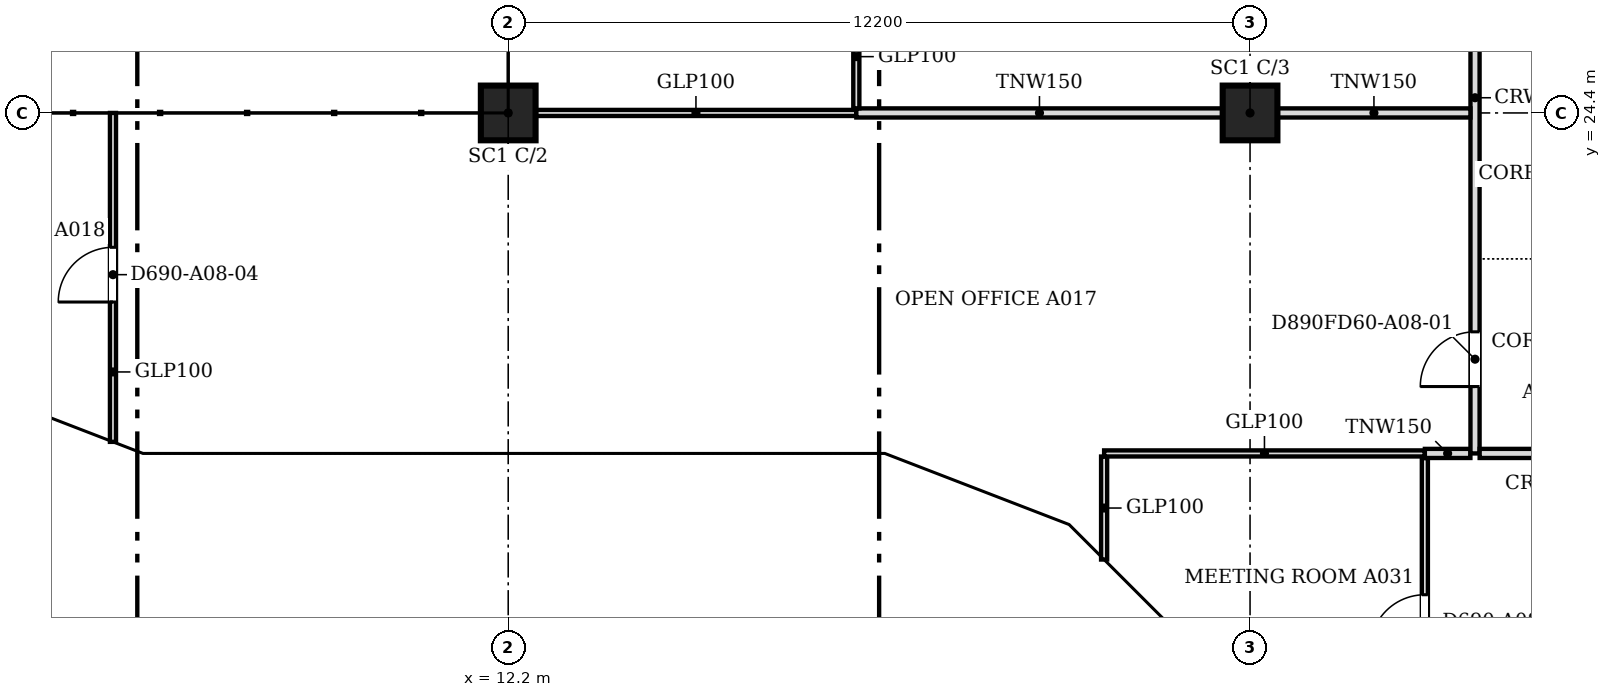
"""IFC4 building model, lengths in metres.
Left out: names, types, materials, properties, quantities, classifications, styles, units other than length and angle.
Written with IfcOpenShell. Run it as: python <this file> out.ifc"""

import sys

from ifc_helpers import new_model, si_unit, direction, frame, frame_2d, origin, origin_2d, place, context, subcontext, project, spatial, polyline, rectangle, outline, extrude, faceted_brep, source, transform, mapped, element, fill, save


model = new_model("IFC4")
c1 = context("Model", 3, precision=1e-05, world=origin(), true_north=direction((0.0, 1.0)))
c2 = subcontext(c1, "Body", "Model", "MODEL_VIEW")
j1 = project(units=[si_unit("LENGTHUNIT", "METRE"), si_unit("PLANEANGLEUNIT", "RADIAN")], contexts=[c1])
p1 = place(None, origin())
s1 = spatial("IfcSite", under=j1, at=p1, CompositionType="ELEMENT")
p2 = place(p1, origin())
s2 = spatial("IfcBuilding", under=s1, at=p2, CompositionType="ELEMENT")
p3 = place(p2, frame((0.0, 0.0, 91.4)))
s3 = spatial("IfcBuildingStorey", under=s2, at=p3, CompositionType="ELEMENT", Elevation=91.4)
for number, where, z_axis, x_axis in (
    (1, (12.2, 24.4, 0.0), (0.0, 0.0, 1.0), (1.0, 0.0, 0.0)),
    (2, (24.4, 24.4, 0.0), (0.0, 0.0, 1.0), (1.0, 0.0, 0.0)),
):
    element("IfcColumn", number, at=place(p3, frame(where, z_axis=z_axis, x_axis=x_axis)), inside=s3, PredefinedType="COLUMN", context=c2, shape_type="SweptSolid", body=[
        extrude(rectangle(XDim=0.9, YDim=0.9, at=origin_2d()), origin(), (0.0, 0.0, 1.0), 3.6),
    ])
m1 = source(origin(), c2, "Body", "Brep", [
    faceted_brep([(2.95, -0.25, 0.0), (2.997, -0.25, 0.059), (2.997, -0.25, 7.541), (2.95, -0.25, 7.6), (0.0, -0.25, 3.8), (0.053, 0.25, 3.868), (2.904, 0.25, 7.54), (2.904, 0.25, 0.06), (0.053, 0.25, 3.732), (2.95, 0.0, 0.0), (2.95, 0.0, 7.6), (0.0, 0.0, 3.8)], [[[0, 1, 2, 3, 4]], [[5, 6, 7, 8]], [[1, 0, 9]], [[10, 3, 2]], [[6, 5, 11, 4, 3, 10]], [[8, 7, 9, 0, 4, 11]], [[8, 11, 5]], [[1, 9, 7, 6, 10, 2]]]),
])
p4 = place(p3, frame((3.394, 19.612, -3.8), z_axis=(0.0, 0.0, 1.0), x_axis=(0.932990326376, -0.359901446078, 0.0)))
e3 = element("IfcWall", 3, at=p4, inside=s3, PredefinedType="SOLIDWALL", context=c2, shape_type="MappedRepresentation", body=[
    mapped(m1, transform((0.0, 0.0, 0.0), scale=1.0)),
])
m2 = source(origin(), c2, "Body", "SweptSolid", [
    extrude(outline(polyline([(2.75, 6.935), (0.316, 3.8), (2.75, 0.665), (2.75, 6.935)])), frame((0.0, 0.26, 0.0), z_axis=(0.0, -1.0, 0.0), x_axis=(1.0, 0.0, 0.0)), (0.0, 0.0, 1.0), 0.52),
])
p5 = place(p4, origin())
e4 = element("IfcOpeningElement", 4, at=p5, cuts=e3, PredefinedType="OPENING", context=c2, shape_type="MappedRepresentation", body=[
    mapped(m2, transform((0.0, 0.0, 0.0), scale=1.0)),
])
m3 = source(origin(), c2, "Body", "Brep", [
    faceted_brep([(0.047, -0.25, 0.0), (3.05, -0.25, 3.8), (0.047, -0.25, 7.6), (0.0, -0.25, 7.54), (0.0, -0.25, 0.06), (0.093, 0.25, 7.541), (3.05, 0.25, 3.8), (0.093, 0.25, 0.059), (0.047, 0.0, 0.0), (0.047, 0.0, 7.6)], [[[0, 1, 2, 3, 4]], [[5, 6, 7]], [[7, 6, 1, 0, 8]], [[6, 5, 9, 2, 1]], [[3, 2, 9]], [[8, 0, 4]], [[7, 8, 4, 3, 9, 5]]]),
])
p6 = place(p3, frame((6.1, 18.55, -3.8), z_axis=(0.0, 0.0, 1.0), x_axis=(1.0, 0.0, 0.0)))
e5 = element("IfcWall", 5, at=p6, inside=s3, PredefinedType="SOLIDWALL", context=c2, shape_type="MappedRepresentation", body=[
    mapped(m3, transform((0.0, 0.0, 0.0), scale=1.0)),
])
m4 = source(origin(), c2, "Body", "SweptSolid", [
    extrude(outline(polyline([(0.247, 0.656), (2.731, 3.8), (0.247, 6.944), (0.247, 0.656)])), frame((0.0, 0.26, 0.0), z_axis=(0.0, -1.0, 0.0), x_axis=(1.0, 0.0, 0.0)), (0.0, 0.0, 1.0), 0.52),
])
p7 = place(p6, origin())
e6 = element("IfcOpeningElement", 6, at=p7, cuts=e5, PredefinedType="OPENING", context=c2, shape_type="MappedRepresentation", body=[
    mapped(m4, transform((0.0, 0.0, 0.0), scale=1.0)),
])
m5 = source(origin(), c2, "Body", "SweptSolid", [
    extrude(outline(polyline([(3.05, 0.0), (6.1, 3.8), (3.05, 7.6), (0.0, 3.8), (3.05, 0.0)])), frame((0.0, 0.25, 0.0), z_axis=(0.0, -1.0, 0.0), x_axis=(1.0, 0.0, 0.0)), (0.0, 0.0, 1.0), 0.5),
])
p8 = place(p3, frame((9.15, 18.55, -3.8), z_axis=(0.0, 0.0, 1.0), x_axis=(1.0, 0.0, 0.0)))
e7 = element("IfcWall", 7, at=p8, inside=s3, PredefinedType="SOLIDWALL", context=c2, shape_type="MappedRepresentation", body=[
    mapped(m5, transform((0.0, 0.0, 0.0), scale=1.0)),
])
m6 = source(origin(), c2, "Body", "SweptSolid", [
    extrude(outline(polyline([(3.05, 0.399), (5.78, 3.8), (3.05, 7.2), (0.321, 3.8), (3.05, 0.399)])), frame((0.0, 0.26, 0.0), z_axis=(0.0, -1.0, 0.0), x_axis=(1.0, 0.0, 0.0)), (0.0, 0.0, 1.0), 0.52),
])
p9 = place(p8, origin())
e8 = element("IfcOpeningElement", 8, at=p9, cuts=e7, PredefinedType="OPENING", context=c2, shape_type="MappedRepresentation", body=[
    mapped(m6, transform((0.0, 0.0, 0.0), scale=1.0)),
])
m7 = source(origin(), c2, "Body", "Brep", [
    faceted_brep([(3.05, -0.25, 7.543), (0.0, -0.25, 3.8), (3.05, -0.25, 0.057), (0.0, 0.25, 3.8), (3.096, 0.25, 7.6), (3.143, 0.25, 7.543), (3.143, 0.25, 0.056), (3.096, 0.25, 0.0), (3.096, -0.0, 0.0), (3.096, -0.0, 7.6)], [[[0, 1, 2]], [[3, 4, 5, 6, 7]], [[7, 6, 8]], [[5, 4, 9]], [[4, 3, 1, 0, 9]], [[3, 7, 8, 2, 1]], [[2, 8, 6, 5, 9, 0]]]),
])
p10 = place(p3, frame((15.25, 18.55, -3.8), z_axis=(0.0, 0.0, 1.0), x_axis=(1.0, 0.0, 0.0)))
e9 = element("IfcWall", 9, at=p10, inside=s3, PredefinedType="SOLIDWALL", context=c2, shape_type="MappedRepresentation", body=[
    mapped(m7, transform((0.0, 0.0, 0.0), scale=1.0)),
])
m8 = source(origin(), c2, "Body", "SweptSolid", [
    extrude(outline(polyline([(2.896, 6.959), (0.323, 3.8), (2.896, 0.641), (2.896, 6.959)])), frame((0.0, 0.26, 0.0), z_axis=(0.0, -1.0, 0.0), x_axis=(1.0, 0.0, 0.0)), (0.0, 0.0, 1.0), 0.52),
])
p11 = place(p10, origin())
e10 = element("IfcOpeningElement", 10, at=p11, cuts=e9, PredefinedType="OPENING", context=c2, shape_type="MappedRepresentation", body=[
    mapped(m8, transform((0.0, 0.0, 0.0), scale=1.0)),
])
m9 = source(origin(), c2, "Body", "Brep", [
    faceted_brep([(0.093, -0.25, 0.056), (3.143, -0.25, 3.736), (3.143, -0.25, 3.864), (0.093, -0.25, 7.544), (0.0, 0.25, 7.543), (0.047, 0.25, 7.6), (3.196, 0.25, 3.8), (0.047, 0.25, 0.0), (0.0, 0.25, 0.057), (3.196, -0.0, 3.8), (0.047, 0.0, 0.0), (0.047, 0.0, 7.6)], [[[0, 1, 2, 3]], [[4, 5, 6, 7, 8]], [[7, 6, 9, 1, 0, 10]], [[6, 5, 11, 3, 2, 9]], [[5, 4, 11]], [[8, 7, 10]], [[8, 10, 0, 3, 11, 4]], [[1, 9, 2]]]),
])
p12 = place(p3, frame((18.303, 18.567, -3.8), z_axis=(0.0, 0.0, 1.0), x_axis=(0.932978940178, -0.359930961693, 0.0)))
e11 = element("IfcWall", 11, at=p12, inside=s3, PredefinedType="SOLIDWALL", context=c2, shape_type="MappedRepresentation", body=[
    mapped(m9, transform((0.0, 0.0, 0.0), scale=1.0)),
])
m10 = source(origin(), c2, "Body", "SweptSolid", [
    extrude(outline(polyline([(0.247, 0.633), (2.871, 3.8), (0.247, 6.967), (0.247, 0.633)])), frame((0.0, 0.26, 0.0), z_axis=(0.0, -1.0, 0.0), x_axis=(1.0, 0.0, 0.0)), (0.0, 0.0, 1.0), 0.52),
])
p13 = place(p12, origin())
e12 = element("IfcOpeningElement", 12, at=p13, cuts=e11, PredefinedType="OPENING", context=c2, shape_type="MappedRepresentation", body=[
    mapped(m10, transform((0.0, 0.0, 0.0), scale=1.0)),
])
m11 = source(origin(), c2, "Body", "Brep", [
    faceted_brep([(3.103, -0.25, 7.536), (0.053, -0.25, 3.864), (0.053, -0.25, 3.736), (3.103, -0.25, 0.064), (0.0, 0.25, 3.8), (3.156, 0.25, 7.6), (3.209, 0.25, 7.536), (3.209, 0.25, 0.064), (3.156, 0.25, 0.0), (3.156, -0.0, 0.0), (3.156, -0.0, 7.6), (0.0, 0.0, 3.8)], [[[0, 1, 2, 3]], [[4, 5, 6, 7, 8]], [[8, 7, 9]], [[6, 5, 10]], [[5, 4, 11, 1, 0, 10]], [[4, 8, 9, 3, 2, 11]], [[11, 2, 1]], [[3, 9, 7, 6, 10, 0]]]),
])
p14 = place(p3, frame((21.285, 17.417, -3.8), z_axis=(0.0, 0.0, 1.0), x_axis=(0.707106781187, -0.707106781187, 0.0)))
e13 = element("IfcWall", 13, at=p14, inside=s3, PredefinedType="SOLIDWALL", context=c2, shape_type="MappedRepresentation", body=[
    mapped(m11, transform((0.0, 0.0, 0.0), scale=1.0)),
])
m12 = source(origin(), c2, "Body", "SweptSolid", [
    extrude(outline(polyline([(2.956, 6.968), (0.325, 3.8), (2.956, 0.632), (2.956, 6.968)])), frame((0.0, 0.26, 0.0), z_axis=(0.0, -1.0, 0.0), x_axis=(1.0, 0.0, 0.0)), (0.0, 0.0, 1.0), 0.52),
])
p15 = place(p14, origin())
e14 = element("IfcOpeningElement", 14, at=p15, cuts=e13, PredefinedType="OPENING", context=c2, shape_type="MappedRepresentation", body=[
    mapped(m12, transform((0.0, 0.0, 0.0), scale=1.0)),
])
p16 = place(p2, frame((0.0, 0.0, 95.2)))
s4 = spatial("IfcBuildingStorey", under=s2, at=p16, CompositionType="ELEMENT", Elevation=95.2)
m13 = source(origin(), c2, "Body", "Brep", [
    faceted_brep([(0.053, -0.25, 0.0), (3.003, -0.25, 3.8), (0.053, -0.25, 7.6), (0.0, -0.25, 7.532), (0.0, -0.25, 0.068), (0.106, 0.25, 7.532), (2.957, 0.25, 3.86), (2.957, 0.25, 3.74), (0.106, 0.25, 0.068), (3.003, 0.0, 3.8), (0.053, 0.0, 0.0), (0.053, 0.0, 7.6)], [[[0, 1, 2, 3, 4]], [[5, 6, 7, 8]], [[8, 7, 9, 1, 0, 10]], [[6, 5, 11, 2, 1, 9]], [[3, 2, 11]], [[10, 0, 4]], [[8, 10, 4, 3, 11, 5]], [[9, 7, 6]]]),
])
p17 = place(p16, frame((3.344, 19.631, -3.8), z_axis=(0.0, 0.0, 1.0), x_axis=(0.933007896601, -0.359855894603, 0.0)))
e15 = element("IfcWall", 15, at=p17, inside=s4, PredefinedType="SOLIDWALL", context=c2, shape_type="MappedRepresentation", body=[
    mapped(m13, transform((0.0, 0.0, 0.0), scale=1.0)),
])
m14 = source(origin(), c2, "Body", "SweptSolid", [
    extrude(outline(polyline([(0.253, 0.665), (2.687, 3.8), (0.253, 6.935), (0.253, 0.665)])), frame((0.0, 0.26, 0.0), z_axis=(0.0, -1.0, 0.0), x_axis=(1.0, 0.0, 0.0)), (0.0, 0.0, 1.0), 0.52),
])
p18 = place(p17, origin())
e16 = element("IfcOpeningElement", 16, at=p18, cuts=e15, PredefinedType="OPENING", context=c2, shape_type="MappedRepresentation", body=[
    mapped(m14, transform((0.0, 0.0, 0.0), scale=1.0)),
])
m15 = source(origin(), c2, "Body", "Brep", [
    faceted_brep([(3.003, -0.25, 0.0), (6.053, -0.25, 3.8), (3.003, -0.25, 7.6), (0.0, -0.25, 3.8), (0.047, 0.25, 3.859), (3.003, 0.25, 7.6), (6.053, 0.25, 3.8), (3.003, 0.25, 0.0), (0.047, 0.25, 3.741), (0.0, 0.0, 3.8)], [[[0, 1, 2, 3]], [[4, 5, 6, 7, 8]], [[7, 6, 1, 0]], [[6, 5, 2, 1]], [[5, 4, 9, 3, 2]], [[8, 7, 0, 3, 9]], [[8, 9, 4]]]),
])
p19 = place(p16, frame((6.146, 18.55, -3.8), z_axis=(0.0, 0.0, 1.0), x_axis=(1.0, 0.0, 0.0)))
e17 = element("IfcWall", 17, at=p19, inside=s4, PredefinedType="SOLIDWALL", context=c2, shape_type="MappedRepresentation", body=[
    mapped(m15, transform((0.0, 0.0, 0.0), scale=1.0)),
])
m16 = source(origin(), c2, "Body", "SweptSolid", [
    extrude(outline(polyline([(3.005, 0.401), (5.733, 3.8), (3.005, 7.199), (0.319, 3.8), (3.005, 0.401)])), frame((0.0, 0.26, 0.0), z_axis=(0.0, -1.0, 0.0), x_axis=(1.0, 0.0, 0.0)), (0.0, 0.0, 1.0), 0.52),
])
p20 = place(p19, origin())
e18 = element("IfcOpeningElement", 18, at=p20, cuts=e17, PredefinedType="OPENING", context=c2, shape_type="MappedRepresentation", body=[
    mapped(m16, transform((0.0, 0.0, 0.0), scale=1.0)),
])
m17 = source(origin(), c2, "Body", "Brep", [
    faceted_brep([(3.05, -0.25, 0.0), (6.1, -0.25, 3.743), (6.1, -0.25, 3.857), (3.05, -0.25, 7.6), (0.0, -0.25, 3.8), (0.0, 0.25, 3.8), (3.05, 0.25, 7.6), (6.146, 0.25, 3.8), (3.05, 0.25, 0.0), (6.146, -0.0, 3.8)], [[[0, 1, 2, 3, 4]], [[5, 6, 7, 8]], [[8, 7, 9, 1, 0]], [[7, 6, 3, 2, 9]], [[6, 5, 4, 3]], [[5, 8, 0, 4]], [[1, 9, 2]]]),
])
p21 = place(p16, frame((12.2, 18.55, -3.8), z_axis=(0.0, 0.0, 1.0), x_axis=(1.0, 0.0, 0.0)))
e19 = element("IfcWall", 19, at=p21, inside=s4, PredefinedType="SOLIDWALL", context=c2, shape_type="MappedRepresentation", body=[
    mapped(m17, transform((0.0, 0.0, 0.0), scale=1.0)),
])
m18 = source(origin(), c2, "Body", "SweptSolid", [
    extrude(outline(polyline([(3.052, 0.398), (5.824, 3.8), (3.052, 7.203), (0.321, 3.8), (3.052, 0.398)])), frame((0.0, 0.26, 0.0), z_axis=(0.0, -1.0, 0.0), x_axis=(1.0, 0.0, 0.0)), (0.0, 0.0, 1.0), 0.52),
])
p22 = place(p21, origin())
e20 = element("IfcOpeningElement", 20, at=p22, cuts=e19, PredefinedType="OPENING", context=c2, shape_type="MappedRepresentation", body=[
    mapped(m18, transform((0.0, 0.0, 0.0), scale=1.0)),
])
m19 = source(origin(), c2, "Body", "Brep", [
    faceted_brep([(3.096, -0.25, 7.536), (0.047, -0.25, 3.856), (0.047, -0.25, 3.744), (3.096, -0.25, 0.064), (0.0, 0.25, 3.8), (3.149, 0.25, 7.6), (3.202, 0.25, 7.536), (3.202, 0.25, 0.064), (3.149, 0.25, 0.0), (3.149, -0.0, 0.0), (3.149, -0.0, 7.6), (0.0, 0.0, 3.8)], [[[0, 1, 2, 3]], [[4, 5, 6, 7, 8]], [[8, 7, 9]], [[6, 5, 10]], [[5, 4, 11, 1, 0, 10]], [[4, 8, 9, 3, 2, 11]], [[11, 2, 1]], [[3, 9, 7, 6, 10, 0]]]),
])
p23 = place(p16, frame((18.346, 18.55, -3.8), z_axis=(0.0, 0.0, 1.0), x_axis=(0.932985567668, -0.359913782069, 0.0)))
e21 = element("IfcWall", 21, at=p23, inside=s4, PredefinedType="SOLIDWALL", context=c2, shape_type="MappedRepresentation", body=[
    mapped(m19, transform((0.0, 0.0, 0.0), scale=1.0)),
])
m20 = source(origin(), c2, "Body", "SweptSolid", [
    extrude(outline(polyline([(2.949, 6.967), (0.325, 3.8), (2.949, 0.633), (2.949, 6.967)])), frame((0.0, 0.26, 0.0), z_axis=(0.0, -1.0, 0.0), x_axis=(1.0, 0.0, 0.0)), (0.0, 0.0, 1.0), 0.52),
])
p24 = place(p23, origin())
e22 = element("IfcOpeningElement", 22, at=p24, cuts=e21, PredefinedType="OPENING", context=c2, shape_type="MappedRepresentation", body=[
    mapped(m20, transform((0.0, 0.0, 0.0), scale=1.0)),
])
m21 = source(origin(), c2, "Body", "Brep", [
    faceted_brep([(0.106, -0.25, 0.064), (3.156, -0.25, 3.736), (3.156, -0.25, 3.864), (0.106, -0.25, 7.536), (0.0, 0.25, 7.536), (0.053, 0.25, 7.6), (3.209, 0.25, 3.8), (0.053, 0.25, 0.0), (0.0, 0.25, 0.064), (3.209, -0.0, 3.8), (0.053, 0.0, 0.0), (0.053, 0.0, 7.6)], [[[0, 1, 2, 3]], [[4, 5, 6, 7, 8]], [[7, 6, 9, 1, 0, 10]], [[6, 5, 11, 3, 2, 9]], [[5, 4, 11]], [[8, 7, 10]], [[8, 10, 0, 3, 11, 4]], [[1, 9, 2]]]),
])
p25 = place(p16, frame((21.248, 17.454, -3.8), z_axis=(0.0, 0.0, 1.0), x_axis=(0.707106781187, -0.707106781187, 0.0)))
e23 = element("IfcWall", 23, at=p25, inside=s4, PredefinedType="SOLIDWALL", context=c2, shape_type="MappedRepresentation", body=[
    mapped(m21, transform((0.0, 0.0, 0.0), scale=1.0)),
])
m22 = source(origin(), c2, "Body", "SweptSolid", [
    extrude(outline(polyline([(0.253, 0.632), (2.884, 3.8), (0.253, 6.968), (0.253, 0.632)])), frame((0.0, 0.26, 0.0), z_axis=(0.0, -1.0, 0.0), x_axis=(1.0, 0.0, 0.0)), (0.0, 0.0, 1.0), 0.52),
])
p26 = place(p25, origin())
e24 = element("IfcOpeningElement", 24, at=p26, cuts=e23, PredefinedType="OPENING", context=c2, shape_type="MappedRepresentation", body=[
    mapped(m22, transform((0.0, 0.0, 0.0), scale=1.0)),
])
p27 = place(p3, frame((27.275, 13.276, 0.0), z_axis=(0.0, 0.0, 1.0), x_axis=(0.0, 1.0, 0.0)))
e25 = element("IfcWall", 25, at=p27, inside=s3, PredefinedType="PARTITIONING", context=c2, shape_type="SweptSolid", body=[
    extrude(rectangle(XDim=5.448, YDim=0.1, at=frame_2d((2.724, 0.0))), origin(), (0.0, 0.0, 1.0), 2.895),
])
m23 = source(origin(), c2, "Body", "SweptSolid", [
    extrude(rectangle(XDim=0.9, YDim=2.1, at=frame_2d((0.45, 1.05))), frame((0.0, 0.06, 0.0), z_axis=(0.0, -1.0, 0.0), x_axis=(1.0, 0.0, 0.0)), (0.0, 0.0, 1.0), 0.12),
])
p28 = place(p27, frame((2.3, 0.0, 0.0)))
e26 = element("IfcOpeningElement", 26, at=p28, cuts=e25, PredefinedType="OPENING", context=c2, shape_type="MappedRepresentation", body=[
    mapped(m23, transform((0.0, 0.0, 0.0), scale=1.0)),
])
p29 = place(p3, frame((22.0, 17.055, 0.0), z_axis=(0.0, 0.0, 1.0), x_axis=(0.0, 1.0, 0.0)))
e27 = element("IfcWall", 27, at=p29, inside=s3, PredefinedType="PARTITIONING", context=c2, shape_type="SweptSolid", body=[
    extrude(rectangle(XDim=1.694, YDim=0.1, at=frame_2d((0.847, 0.0))), origin(), (0.0, 0.0, 1.0), 2.895),
])
p30 = place(p3, frame((22.0, 18.8, 0.0), z_axis=(0.0, 0.0, 1.0), x_axis=(1.0, 0.0, 0.0)))
e28 = element("IfcWall", 28, at=p30, inside=s3, PredefinedType="PARTITIONING", context=c2, shape_type="SweptSolid", body=[
    extrude(rectangle(XDim=5.274, YDim=0.1, at=frame_2d((2.637, 0.0))), origin(), (0.0, 0.0, 1.0), 2.895),
])
p31 = place(p3, frame((27.275, 18.8, 0.0), z_axis=(0.0, 0.0, 1.0), x_axis=(1.0, 0.0, 0.0)))
e29 = element("IfcWall", 29, at=p31, inside=s3, PredefinedType="PARTITIONING", context=c2, shape_type="SweptSolid", body=[
    extrude(rectangle(XDim=0.749, YDim=0.15, at=frame_2d((0.375, 0.0))), origin(), (0.0, 0.0, 1.0), 2.895),
])
p32 = place(p3, frame((28.1, 18.8, 0.0), z_axis=(0.0, 0.0, 1.0), x_axis=(0.0, 1.0, 0.0)))
e30 = element("IfcWall", 30, at=p32, inside=s3, PredefinedType="PARTITIONING", context=c2, shape_type="SweptSolid", body=[
    extrude(rectangle(XDim=26.424, YDim=0.15, at=frame_2d((13.212, 0.0))), origin(), (0.0, 0.0, 1.0), 2.895),
])
m24 = source(origin(), c2, "Body", "SweptSolid", [
    extrude(rectangle(XDim=0.9, YDim=2.1, at=frame_2d((0.45, 1.05))), frame((0.0, 0.085, 0.0), z_axis=(0.0, -1.0, 0.0), x_axis=(1.0, 0.0, 0.0)), (0.0, 0.0, 1.0), 0.17),
])
p33 = place(p32, frame((1.1, 0.0, 0.0)))
e31 = element("IfcOpeningElement", 31, at=p33, cuts=e30, PredefinedType="OPENING", context=c2, shape_type="MappedRepresentation", body=[
    mapped(m24, transform((0.0, 0.0, 0.0), scale=1.0)),
])
p34 = place(p32, frame((23.151, 0.0, 0.0)))
e32 = element("IfcOpeningElement", 32, at=p34, cuts=e30, PredefinedType="OPENING", context=c2, shape_type="MappedRepresentation", body=[
    mapped(m24, transform((0.0, 0.0, 0.0), scale=1.0)),
])
m25 = source(origin(), c2, "Body", "SweptSolid", [
    extrude(rectangle(XDim=1.0, YDim=2.1, at=frame_2d((0.5, 1.05))), frame((0.0, 0.085, 0.0), z_axis=(0.0, -1.0, 0.0), x_axis=(1.0, 0.0, 0.0)), (0.0, 0.0, 1.0), 0.17),
])
p35 = place(p32, frame((17.251, 0.0, 0.0)))
e33 = element("IfcOpeningElement", 33, at=p35, cuts=e30, PredefinedType="OPENING", context=c2, shape_type="MappedRepresentation", body=[
    mapped(m25, transform((0.0, 0.0, 0.0), scale=1.0)),
])
p36 = place(p32, frame((9.7, 0.0, 0.0)))
e34 = element("IfcOpeningElement", 34, at=p36, cuts=e30, PredefinedType="OPENING", context=c2, shape_type="MappedRepresentation", body=[
    mapped(m24, transform((0.0, 0.0, 0.0), scale=1.0)),
])
p37 = place(p3, frame((28.176, 18.8, 0.0), z_axis=(0.0, 0.0, 1.0), x_axis=(1.0, 0.0, 0.0)))
e35 = element("IfcWall", 35, at=p37, inside=s3, PredefinedType="PARTITIONING", context=c2, shape_type="SweptSolid", body=[
    extrude(rectangle(XDim=2.248, YDim=0.15, at=frame_2d((1.124, 0.0))), origin(), (0.0, 0.0, 1.0), 2.895),
])
p38 = place(p3, frame((5.7, 18.99, 0.0), z_axis=(0.0, 0.0, 1.0), x_axis=(0.0, 1.0, 0.0)))
e36 = element("IfcWall", 36, at=p38, inside=s3, PredefinedType="PARTITIONING", context=c2, shape_type="SweptSolid", body=[
    extrude(rectangle(XDim=5.41, YDim=0.1, at=frame_2d((2.705, 0.0))), origin(), (0.0, 0.0, 1.0), 2.895),
])
p39 = place(p38, frame((2.3, 0.0, 0.0)))
e37 = element("IfcOpeningElement", 37, at=p39, cuts=e36, PredefinedType="OPENING", context=c2, shape_type="MappedRepresentation", body=[
    mapped(m23, transform((0.0, 0.0, 0.0), scale=1.0)),
])
p40 = place(p3, frame((12.651, 24.4, 0.0), z_axis=(0.0, 0.0, 1.0), x_axis=(1.0, 0.0, 0.0)))
e38 = element("IfcWall", 38, at=p40, inside=s3, PredefinedType="PARTITIONING", context=c2, shape_type="SweptSolid", body=[
    extrude(rectangle(XDim=5.273, YDim=0.1, at=frame_2d((2.637, 0.0))), origin(), (0.0, 0.0, 1.0), 2.895),
])
p41 = place(p3, frame((17.925, 24.4, 0.0), z_axis=(0.0, 0.0, 1.0), x_axis=(1.0, 0.0, 0.0)))
e39 = element("IfcWall", 39, at=p41, inside=s3, PredefinedType="PARTITIONING", context=c2, shape_type="SweptSolid", body=[
    extrude(rectangle(XDim=6.024, YDim=0.15, at=frame_2d((3.012, 0.0))), origin(), (0.0, 0.0, 1.0), 2.895),
])
p42 = place(p3, frame((24.851, 24.4, 0.0), z_axis=(0.0, 0.0, 1.0), x_axis=(1.0, 0.0, 0.0)))
e40 = element("IfcWall", 40, at=p42, inside=s3, PredefinedType="PARTITIONING", context=c2, shape_type="SweptSolid", body=[
    extrude(rectangle(XDim=3.173, YDim=0.15, at=frame_2d((1.586, 0.0))), origin(), (0.0, 0.0, 1.0), 2.895),
])
p43 = place(p3, frame((17.925, 24.476, 0.0), z_axis=(0.0, 0.0, 1.0), x_axis=(0.0, 1.0, 0.0)))
e41 = element("IfcWall", 41, at=p43, inside=s3, PredefinedType="PARTITIONING", context=c2, shape_type="SweptSolid", body=[
    extrude(rectangle(XDim=4.293, YDim=0.1, at=frame_2d((2.146, 0.0))), origin(), (0.0, 0.0, 1.0), 2.895),
])
p44 = place(p43, frame((1.7, 0.0, 0.0)))
e42 = element("IfcOpeningElement", 42, at=p44, cuts=e41, PredefinedType="OPENING", context=c2, shape_type="MappedRepresentation", body=[
    mapped(m23, transform((0.0, 0.0, 0.0), scale=1.0)),
])
m26 = source(origin(), c2, "Body", "SweptSolid", [
    extrude(rectangle(XDim=0.9, YDim=2.1, at=frame_2d((0.45, 1.05))), frame((0.0, 0.025, 0.0), z_axis=(0.0, -1.0, 0.0), x_axis=(1.0, 0.0, 0.0)), (0.0, 0.0, 1.0), 0.05),
])
p45 = place(p33, origin())
e43 = element("IfcDoor", 43, at=p45, inside=s3, OperationType="SINGLE_SWING_LEFT", PredefinedType="DOOR", context=c2, shape_type="MappedRepresentation", body=[
    mapped(m26, transform((0.0, 0.0, 0.0), scale=1.0)),
])
fill(e31, e43)
p46 = place(p39, origin())
e44 = element("IfcDoor", 44, at=p46, inside=s3, OperationType="SINGLE_SWING_LEFT", PredefinedType="DOOR", context=c2, shape_type="MappedRepresentation", body=[
    mapped(m26, transform((0.0, 0.0, 0.0), scale=1.0)),
])
fill(e37, e44)
p47 = place(p28, origin())
e45 = element("IfcDoor", 45, at=p47, inside=s3, OperationType="SINGLE_SWING_LEFT", PredefinedType="DOOR", context=c2, shape_type="MappedRepresentation", body=[
    mapped(m26, transform((0.0, 0.0, 0.0), scale=1.0)),
])
fill(e26, e45)
save(model, sys.argv[1])
